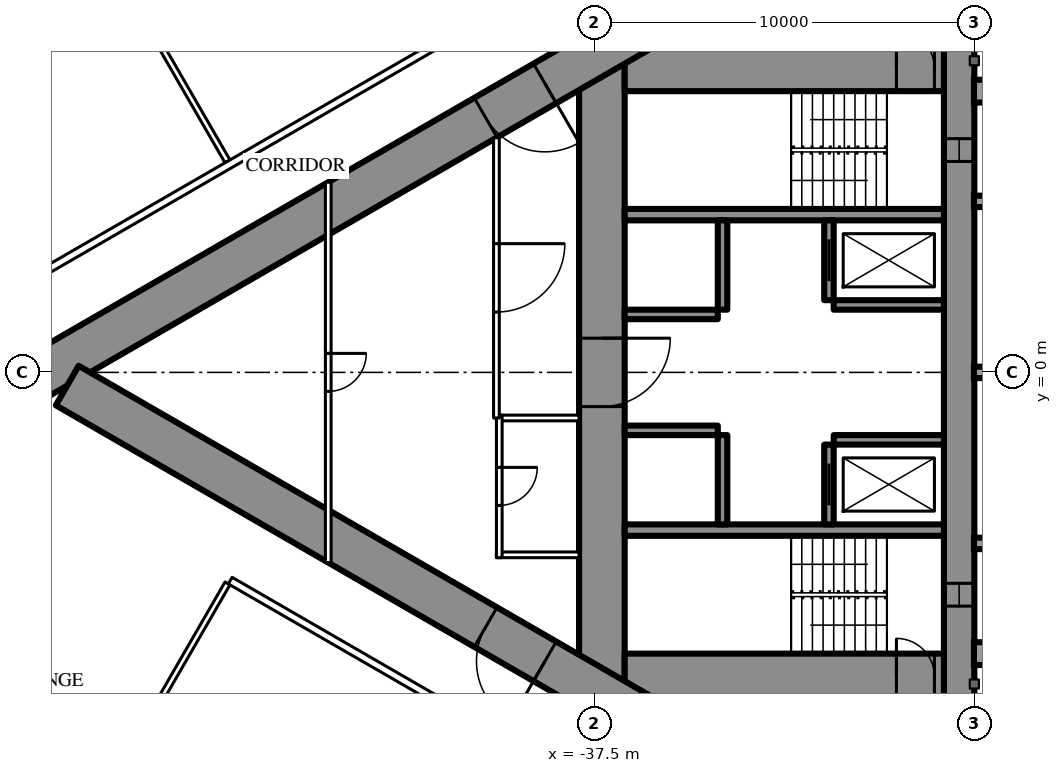
"""IFC4 building model, lengths in metres.
Left out: names, types, materials, properties, quantities, classifications, styles, units other than length and angle.
Written with IfcOpenShell. Run it as: python <this file> out.ifc"""

import sys

from ifc_helpers import new_model, si_unit, direction, frame, frame_2d, origin, place, context, subcontext, project, spatial, rectangle, extrude, element, fill, save


model = new_model("IFC4")
c1 = context("Model", 3, precision=1e-05, world=origin(), true_north=direction((0.0, 1.0)))
c2 = subcontext(c1, "Body", "Model", "MODEL_VIEW")
j1 = project(units=[si_unit("LENGTHUNIT", "METRE"), si_unit("PLANEANGLEUNIT", "RADIAN")], contexts=[c1])
p1 = place(None, origin())
s1 = spatial("IfcSite", under=j1, at=p1, CompositionType="ELEMENT")
p2 = place(p1, origin())
s2 = spatial("IfcBuilding", under=s1, at=p2, CompositionType="ELEMENT")
p3 = place(p2, frame((0.0, 0.0, 139.6)))
s3 = spatial("IfcBuildingStorey", under=s2, at=p3, CompositionType="ELEMENT", Elevation=139.6)
p4 = place(p3, frame((-27.9, 8.6, 0.0), z_axis=(0.0, 0.0, 1.0), x_axis=(0.0, -1.0, 0.0)))
e1 = element("IfcWall", 1, at=p4, inside=s3, PredefinedType="SHEAR", context=c2, shape_type="SweptSolid", body=[
    extrude(rectangle(XDim=17.2, YDim=0.8, at=frame_2d((8.6, 0.0))), origin(), (0.0, 0.0, 1.0), 3.5),
])
p5 = place(p4, frame((2.45, 0.0, 0.6)))
e2 = element("IfcOpeningElement", 2, at=p5, cuts=e1, PredefinedType="OPENING", context=c2, shape_type="SweptSolid", body=[
    extrude(rectangle(XDim=0.6, YDim=2.1, at=frame_2d((0.3, 1.05))), frame((0.0, 0.41, 0.0), z_axis=(0.0, -1.0, 0.0), x_axis=(1.0, 0.0, 0.0)), (0.0, 0.0, 1.0), 0.82),
])
p6 = place(p4, frame((14.15, 0.0, 0.6)))
e3 = element("IfcOpeningElement", 3, at=p6, cuts=e1, PredefinedType="OPENING", context=c2, shape_type="SweptSolid", body=[
    extrude(rectangle(XDim=0.6, YDim=2.1, at=frame_2d((0.3, 1.05))), frame((0.0, 0.41, 0.0), z_axis=(0.0, -1.0, 0.0), x_axis=(1.0, 0.0, 0.0)), (0.0, 0.0, 1.0), 0.82),
])
p7 = place(p3, frame((-37.3, 8.6, 0.0), z_axis=(0.0, 0.0, 1.0), x_axis=(0.0, -1.0, 0.0)))
e4 = element("IfcWall", 4, at=p7, inside=s3, PredefinedType="SHEAR", context=c2, shape_type="SweptSolid", body=[
    extrude(rectangle(XDim=17.2, YDim=1.2, at=frame_2d((8.6, 0.0))), origin(), (0.0, 0.0, 1.0), 3.5),
])
p8 = place(p7, frame((7.7, 0.0, 0.0)))
e5 = element("IfcOpeningElement", 5, at=p8, cuts=e4, PredefinedType="OPENING", context=c2, shape_type="SweptSolid", body=[
    extrude(rectangle(XDim=1.8, YDim=2.2, at=frame_2d((0.9, 1.1))), frame((0.0, 0.61, 0.0), z_axis=(0.0, -1.0, 0.0), x_axis=(1.0, 0.0, 0.0)), (0.0, 0.0, 1.0), 1.22),
])
p9 = place(p3, frame((-28.3, 8.0, 0.0), z_axis=(0.0, 0.0, 1.0), x_axis=(-1.0, 0.0, 0.0)))
e6 = element("IfcWall", 6, at=p9, inside=s3, PredefinedType="SHEAR", context=c2, shape_type="SweptSolid", body=[
    extrude(rectangle(XDim=8.4, YDim=1.2, at=frame_2d((4.2, 0.0))), origin(), (0.0, 0.0, 1.0), 3.5),
])
p10 = place(p9, frame((0.25, 0.0, 0.0)))
e7 = element("IfcOpeningElement", 7, at=p10, cuts=e6, PredefinedType="OPENING", context=c2, shape_type="SweptSolid", body=[
    extrude(rectangle(XDim=1.0, YDim=2.2, at=frame_2d((0.5, 1.1))), frame((0.0, 0.61, 0.0), z_axis=(0.0, -1.0, 0.0), x_axis=(1.0, 0.0, 0.0)), (0.0, 0.0, 1.0), 1.22),
])
p11 = place(p3, frame((-28.3, -8.0, 0.0), z_axis=(0.0, 0.0, 1.0), x_axis=(-1.0, 0.0, 0.0)))
e8 = element("IfcWall", 8, at=p11, inside=s3, PredefinedType="SHEAR", context=c2, shape_type="SweptSolid", body=[
    extrude(rectangle(XDim=8.4, YDim=1.2, at=frame_2d((4.2, 0.0))), origin(), (0.0, 0.0, 1.0), 3.5),
])
p12 = place(p11, frame((0.25, 0.0, 0.0)))
e9 = element("IfcOpeningElement", 9, at=p12, cuts=e8, PredefinedType="OPENING", context=c2, shape_type="SweptSolid", body=[
    extrude(rectangle(XDim=1.0, YDim=2.2, at=frame_2d((0.5, 1.1))), frame((0.0, 0.61, 0.0), z_axis=(0.0, -1.0, 0.0), x_axis=(1.0, 0.0, 0.0)), (0.0, 0.0, 1.0), 1.22),
])
for number, where, z_axis, x_axis in (
    (10, (-28.3, 4.15, 0.0), (0.0, 0.0, 1.0), (-1.0, 0.0, 0.0)),
    (11, (-28.3, -4.15, 0.0), (0.0, 0.0, 1.0), (-1.0, 0.0, 0.0)),
):
    element("IfcWall", number, at=place(p3, frame(where, z_axis=z_axis, x_axis=x_axis)), inside=s3, PredefinedType="SHEAR", context=c2, shape_type="SweptSolid", body=[
        extrude(rectangle(XDim=8.4, YDim=0.3, at=frame_2d((4.2, 0.0))), origin(), (0.0, 0.0, 1.0), 3.5),
    ])
p13 = place(p3, frame((-31.325, 4.0, 0.0), z_axis=(0.0, 0.0, 1.0), x_axis=(0.0, -1.0, 0.0)))
e12 = element("IfcWall", 12, at=p13, inside=s3, PredefinedType="SHEAR", context=c2, shape_type="SweptSolid", body=[
    extrude(rectangle(XDim=2.1, YDim=0.25, at=frame_2d((1.05, 0.0))), origin(), (0.0, 0.0, 1.0), 3.5),
])
p14 = place(p13, frame((0.5, 0.0, 0.0)))
e13 = element("IfcOpeningElement", 13, at=p14, cuts=e12, PredefinedType="OPENING", context=c2, shape_type="SweptSolid", body=[
    extrude(rectangle(XDim=1.1, YDim=2.2, at=frame_2d((0.55, 1.1))), frame((0.0, 0.135, 0.0), z_axis=(0.0, -1.0, 0.0), x_axis=(1.0, 0.0, 0.0)), (0.0, 0.0, 1.0), 0.27),
])
p15 = place(p3, frame((-34.125, 4.0, 0.0), z_axis=(0.0, 0.0, 1.0), x_axis=(0.0, -1.0, 0.0)))
e14 = element("IfcWall", 14, at=p15, inside=s3, PredefinedType="SHEAR", context=c2, shape_type="SweptSolid", body=[
    extrude(rectangle(XDim=2.35, YDim=0.25, at=frame_2d((1.175, 0.0))), origin(), (0.0, 0.0, 1.0), 3.5),
])
p16 = place(p3, frame((-28.3, 1.775, 0.0), z_axis=(0.0, 0.0, 1.0), x_axis=(-1.0, 0.0, 0.0)))
e15 = element("IfcWall", 15, at=p16, inside=s3, PredefinedType="SHEAR", context=c2, shape_type="SweptSolid", body=[
    extrude(rectangle(XDim=2.9, YDim=0.25, at=frame_2d((1.45, 0.0))), origin(), (0.0, 0.0, 1.0), 3.5),
])
p17 = place(p3, frame((-34.25, 1.525, 0.0), z_axis=(0.0, 0.0, 1.0), x_axis=(-1.0, 0.0, 0.0)))
e16 = element("IfcWall", 16, at=p17, inside=s3, PredefinedType="SHEAR", context=c2, shape_type="SweptSolid", body=[
    extrude(rectangle(XDim=2.45, YDim=0.25, at=frame_2d((1.225, 0.0))), origin(), (0.0, 0.0, 1.0), 3.5),
])
p18 = place(p3, frame((-31.325, -1.9, 0.0), z_axis=(0.0, 0.0, 1.0), x_axis=(0.0, -1.0, 0.0)))
e17 = element("IfcWall", 17, at=p18, inside=s3, PredefinedType="SHEAR", context=c2, shape_type="SweptSolid", body=[
    extrude(rectangle(XDim=2.1, YDim=0.25, at=frame_2d((1.05, 0.0))), origin(), (0.0, 0.0, 1.0), 3.5),
])
p19 = place(p18, frame((0.5, 0.0, 0.0)))
e18 = element("IfcOpeningElement", 18, at=p19, cuts=e17, PredefinedType="OPENING", context=c2, shape_type="SweptSolid", body=[
    extrude(rectangle(XDim=1.1, YDim=2.2, at=frame_2d((0.55, 1.1))), frame((0.0, 0.135, 0.0), z_axis=(0.0, -1.0, 0.0), x_axis=(1.0, 0.0, 0.0)), (0.0, 0.0, 1.0), 0.27),
])
p20 = place(p3, frame((-34.125, -1.65, 0.0), z_axis=(0.0, 0.0, 1.0), x_axis=(0.0, -1.0, 0.0)))
e19 = element("IfcWall", 19, at=p20, inside=s3, PredefinedType="SHEAR", context=c2, shape_type="SweptSolid", body=[
    extrude(rectangle(XDim=2.35, YDim=0.25, at=frame_2d((1.175, 0.0))), origin(), (0.0, 0.0, 1.0), 3.5),
])
p21 = place(p3, frame((-28.3, -1.775, 0.0), z_axis=(0.0, 0.0, 1.0), x_axis=(-1.0, 0.0, 0.0)))
e20 = element("IfcWall", 20, at=p21, inside=s3, PredefinedType="SHEAR", context=c2, shape_type="SweptSolid", body=[
    extrude(rectangle(XDim=2.9, YDim=0.25, at=frame_2d((1.45, 0.0))), origin(), (0.0, 0.0, 1.0), 3.5),
])
p22 = place(p3, frame((-34.25, -1.525, 0.0), z_axis=(0.0, 0.0, 1.0), x_axis=(-1.0, 0.0, 0.0)))
e21 = element("IfcWall", 21, at=p22, inside=s3, PredefinedType="SHEAR", context=c2, shape_type="SweptSolid", body=[
    extrude(rectangle(XDim=2.45, YDim=0.25, at=frame_2d((1.225, 0.0))), origin(), (0.0, 0.0, 1.0), 3.5),
])
p23 = place(p3, frame((-27.2, 14.3, 0.0), z_axis=(0.0, 0.0, 1.0), x_axis=(-0.866026593062, -0.499997940104, 0.0)))
e22 = element("IfcWall", 22, at=p23, inside=s3, PredefinedType="SHEAR", context=c2, shape_type="SweptSolid", body=[
    extrude(rectangle(XDim=28.946, YDim=1.2, at=frame_2d((14.473, 0.0))), origin(), (0.0, 0.0, 1.0), 3.5),
])
p24 = place(p23, frame((4.6, 0.0, 0.0)))
e23 = element("IfcOpeningElement", 23, at=p24, cuts=e22, PredefinedType="OPENING", context=c2, shape_type="SweptSolid", body=[
    extrude(rectangle(XDim=1.0, YDim=2.2, at=frame_2d((0.5, 1.1))), frame((0.0, 0.61, 0.0), z_axis=(0.0, -1.0, 0.0), x_axis=(1.0, 0.0, 0.0)), (0.0, 0.0, 1.0), 1.22),
])
p25 = place(p23, frame((13.395, 0.0, 0.0)))
e24 = element("IfcOpeningElement", 24, at=p25, cuts=e22, PredefinedType="OPENING", context=c2, shape_type="SweptSolid", body=[
    extrude(rectangle(XDim=1.8, YDim=2.2, at=frame_2d((0.9, 1.1))), frame((0.0, 0.61, 0.0), z_axis=(0.0, -1.0, 0.0), x_axis=(1.0, 0.0, 0.0)), (0.0, 0.0, 1.0), 1.22),
])
p26 = place(p3, frame((-27.2, -14.3, 0.0), z_axis=(0.0, 0.0, 1.0), x_axis=(-0.866024021859, 0.500002393557, 0.0)))
e25 = element("IfcWall", 25, at=p26, inside=s3, PredefinedType="SHEAR", context=c2, shape_type="SweptSolid", body=[
    extrude(rectangle(XDim=27.907, YDim=1.2, at=frame_2d((13.954, 0.0))), origin(), (0.0, 0.0, 1.0), 3.5),
])
p27 = place(p26, frame((4.6, 0.0, 0.0)))
e26 = element("IfcOpeningElement", 26, at=p27, cuts=e25, PredefinedType="OPENING", context=c2, shape_type="SweptSolid", body=[
    extrude(rectangle(XDim=1.0, YDim=2.2, at=frame_2d((0.5, 1.1))), frame((0.0, 0.61, 0.0), z_axis=(0.0, -1.0, 0.0), x_axis=(1.0, 0.0, 0.0)), (0.0, 0.0, 1.0), 1.22),
])
p28 = place(p26, frame((13.395, 0.0, 0.0)))
e27 = element("IfcOpeningElement", 27, at=p28, cuts=e25, PredefinedType="OPENING", context=c2, shape_type="SweptSolid", body=[
    extrude(rectangle(XDim=1.8, YDim=2.2, at=frame_2d((0.9, 1.1))), frame((0.0, 0.61, 0.0), z_axis=(0.0, -1.0, 0.0), x_axis=(1.0, 0.0, 0.0)), (0.0, 0.0, 1.0), 1.22),
])
for number, where, z_axis, x_axis in (
    (28, (-47.151, 5.552, 0.0), (0.0, 0.0, 1.0), (-0.5, 0.866, 0.0)),
    (29, (-47.151, -5.552, 0.0), (0.0, 0.0, 1.0), (-0.5, -0.866, 0.0)),
):
    element("IfcWall", number, at=place(p3, frame(where, z_axis=z_axis, x_axis=x_axis)), inside=s3, PredefinedType="PARTITIONING", context=c2, shape_type="SweptSolid", body=[
        extrude(rectangle(XDim=8.311, YDim=0.15, at=frame_2d((4.156, 0.0))), origin(), (0.0, 0.0, 1.0), 2.2),
    ])
p29 = place(p3, frame((-37.7, 10.894, 0.0), z_axis=(0.0, 0.0, 1.0), x_axis=(-0.866027905338, -0.499995667157, 0.0)))
e30 = element("IfcWall", 30, at=p29, inside=s3, PredefinedType="PARTITIONING", context=c2, shape_type="SweptSolid", body=[
    extrude(rectangle(XDim=21.787, YDim=0.2, at=frame_2d((10.894, 0.0))), origin(), (0.0, 0.0, 1.0), 3.25),
])
p30 = place(p29, frame((17.711, 0.0, 0.0)))
e31 = element("IfcOpeningElement", 31, at=p30, cuts=e30, PredefinedType="OPENING", context=c2, shape_type="SweptSolid", body=[
    extrude(rectangle(XDim=0.95, YDim=2.2, at=frame_2d((0.475, 1.1))), frame((0.0, 0.11, 0.0), z_axis=(0.0, -1.0, 0.0), x_axis=(1.0, 0.0, 0.0)), (0.0, 0.0, 1.0), 0.22),
])
p31 = place(p29, frame((19.399, 0.0, 0.0)))
e32 = element("IfcOpeningElement", 32, at=p31, cuts=e30, PredefinedType="OPENING", context=c2, shape_type="SweptSolid", body=[
    extrude(rectangle(XDim=1.8, YDim=2.2, at=frame_2d((0.9, 1.1))), frame((0.0, 0.11, 0.0), z_axis=(0.0, -1.0, 0.0), x_axis=(1.0, 0.0, 0.0)), (0.0, 0.0, 1.0), 0.22),
])
p32 = place(p29, frame((0.6, 0.0, 0.0)))
e33 = element("IfcOpeningElement", 33, at=p32, cuts=e30, PredefinedType="OPENING", context=c2, shape_type="SweptSolid", body=[
    extrude(rectangle(XDim=0.95, YDim=2.2, at=frame_2d((0.475, 1.1))), frame((0.0, 0.11, 0.0), z_axis=(0.0, -1.0, 0.0), x_axis=(1.0, 0.0, 0.0)), (0.0, 0.0, 1.0), 0.22),
])
p33 = place(p3, frame((-36.92, -11.344, 0.0), z_axis=(0.0, 0.0, 1.0), x_axis=(-0.866027897759, 0.499995680284, 0.0)))
e34 = element("IfcWall", 34, at=p33, inside=s3, PredefinedType="PARTITIONING", context=c2, shape_type="SweptSolid", body=[
    extrude(rectangle(XDim=11.731, YDim=0.2, at=frame_2d((5.865, 0.0))), origin(), (0.0, 0.0, 1.0), 3.25),
])
p34 = place(p33, frame((3.35, 0.0, 0.0)))
e35 = element("IfcOpeningElement", 35, at=p34, cuts=e34, PredefinedType="OPENING", context=c2, shape_type="SweptSolid", body=[
    extrude(rectangle(XDim=1.0, YDim=2.2, at=frame_2d((0.5, 1.1))), frame((0.0, 0.11, 0.0), z_axis=(0.0, -1.0, 0.0), x_axis=(1.0, 0.0, 0.0)), (0.0, 0.0, 1.0), 0.22),
])
for number, where, z_axis, x_axis in (
    (36, (-37.9, -1.2, 0.0), (0.0, 0.0, 1.0), (-1.0, 0.0, 0.0)),
    (37, (-37.9, -4.8, 0.0), (0.0, 0.0, 1.0), (-1.0, 0.0, 0.0)),
):
    element("IfcWall", number, at=place(p3, frame(where, z_axis=z_axis, x_axis=x_axis)), inside=s3, PredefinedType="PARTITIONING", context=c2, shape_type="SweptSolid", body=[
        extrude(rectangle(XDim=2.175, YDim=0.15, at=frame_2d((1.087, 0.0))), origin(), (0.0, 0.0, 1.0), 3.25),
    ])
p35 = place(p3, frame((-40.0, -1.125, 0.0), z_axis=(0.0, 0.0, 1.0), x_axis=(0.0, -1.0, 0.0)))
e38 = element("IfcWall", 38, at=p35, inside=s3, PredefinedType="PARTITIONING", context=c2, shape_type="SweptSolid", body=[
    extrude(rectangle(XDim=3.75, YDim=0.15, at=frame_2d((1.875, 0.0))), origin(), (0.0, 0.0, 1.0), 3.25),
])
p36 = place(p35, frame((1.375, 0.0, 0.0)))
e39 = element("IfcOpeningElement", 39, at=p36, cuts=e38, PredefinedType="OPENING", context=c2, shape_type="SweptSolid", body=[
    extrude(rectangle(XDim=1.0, YDim=2.2, at=frame_2d((0.5, 1.1))), frame((0.0, 0.085, 0.0), z_axis=(0.0, -1.0, 0.0), x_axis=(1.0, 0.0, 0.0)), (0.0, 0.0, 1.0), 0.17),
])
p37 = place(p3, frame((-40.075, 6.174, 0.0), z_axis=(0.0, 0.0, 1.0), x_axis=(0.0, -1.0, 0.0)))
e40 = element("IfcWall", 40, at=p37, inside=s3, PredefinedType="PARTITIONING", context=c2, shape_type="SweptSolid", body=[
    extrude(rectangle(XDim=7.374, YDim=0.15, at=frame_2d((3.687, 0.0))), origin(), (0.0, 0.0, 1.0), 3.25),
])
p38 = place(p37, frame((2.787, 0.0, 0.0)))
e41 = element("IfcOpeningElement", 41, at=p38, cuts=e40, PredefinedType="OPENING", context=c2, shape_type="SweptSolid", body=[
    extrude(rectangle(XDim=1.8, YDim=2.2, at=frame_2d((0.9, 1.1))), frame((0.0, 0.085, 0.0), z_axis=(0.0, -1.0, 0.0), x_axis=(1.0, 0.0, 0.0)), (0.0, 0.0, 1.0), 0.17),
])
p39 = place(p3, frame((-44.5, 5.005, 0.0), z_axis=(0.0, 0.0, 1.0), x_axis=(0.0, -1.0, 0.0)))
e42 = element("IfcWall", 42, at=p39, inside=s3, PredefinedType="PARTITIONING", context=c2, shape_type="SweptSolid", body=[
    extrude(rectangle(XDim=10.009, YDim=0.15, at=frame_2d((5.005, 0.0))), origin(), (0.0, 0.0, 1.0), 2.45),
])
p40 = place(p39, frame((4.505, 0.0, 0.0)))
e43 = element("IfcOpeningElement", 43, at=p40, cuts=e42, PredefinedType="OPENING", context=c2, shape_type="SweptSolid", body=[
    extrude(rectangle(XDim=1.0, YDim=2.2, at=frame_2d((0.5, 1.1))), frame((0.0, 0.085, 0.0), z_axis=(0.0, -1.0, 0.0), x_axis=(1.0, 0.0, 0.0)), (0.0, 0.0, 1.0), 0.17),
])
p41 = place(p36, origin())
e44 = element("IfcDoor", 44, at=p41, inside=s3, OperationType="SINGLE_SWING_LEFT", PredefinedType="DOOR", context=c2, shape_type="SweptSolid", body=[
    extrude(rectangle(XDim=1.0, YDim=2.2, at=frame_2d((0.5, 1.1))), frame((0.0, 0.025, 0.0), z_axis=(0.0, -1.0, 0.0), x_axis=(1.0, 0.0, 0.0)), (0.0, 0.0, 1.0), 0.05),
])
fill(e39, e44)
p42 = place(p38, origin())
e45 = element("IfcDoor", 45, at=p42, inside=s3, OperationType="DOUBLE_DOOR_SINGLE_SWING", PredefinedType="DOOR", context=c2, shape_type="SweptSolid", body=[
    extrude(rectangle(XDim=1.8, YDim=2.2, at=frame_2d((0.9, 1.1))), frame((0.0, 0.025, 0.0), z_axis=(0.0, -1.0, 0.0), x_axis=(1.0, 0.0, 0.0)), (0.0, 0.0, 1.0), 0.05),
])
fill(e41, e45)
p43 = place(p40, origin())
e46 = element("IfcDoor", 46, at=p43, inside=s3, OperationType="SINGLE_SWING_LEFT", PredefinedType="DOOR", context=c2, shape_type="SweptSolid", body=[
    extrude(rectangle(XDim=1.0, YDim=2.2, at=frame_2d((0.5, 1.1))), frame((0.0, 0.025, 0.0), z_axis=(0.0, -1.0, 0.0), x_axis=(1.0, 0.0, 0.0)), (0.0, 0.0, 1.0), 0.05),
])
fill(e43, e46)
p44 = place(p25, origin())
e47 = element("IfcDoor", 47, at=p44, inside=s3, OperationType="DOUBLE_DOOR_SINGLE_SWING", PredefinedType="DOOR", context=c2, shape_type="SweptSolid", body=[
    extrude(rectangle(XDim=1.8, YDim=2.2, at=frame_2d((0.9, 1.1))), frame((0.0, 0.025, 0.0), z_axis=(0.0, -1.0, 0.0), x_axis=(1.0, 0.0, 0.0)), (0.0, 0.0, 1.0), 0.05),
])
fill(e24, e47)
p45 = place(p28, origin())
e48 = element("IfcDoor", 48, at=p45, inside=s3, OperationType="DOUBLE_DOOR_SINGLE_SWING", PredefinedType="DOOR", context=c2, shape_type="SweptSolid", body=[
    extrude(rectangle(XDim=1.8, YDim=2.2, at=frame_2d((0.9, 1.1))), frame((0.0, 0.025, 0.0), z_axis=(0.0, -1.0, 0.0), x_axis=(1.0, 0.0, 0.0)), (0.0, 0.0, 1.0), 0.05),
])
fill(e27, e48)
p46 = place(p8, origin())
e49 = element("IfcDoor", 49, at=p46, inside=s3, OperationType="DOUBLE_DOOR_SINGLE_SWING", PredefinedType="DOOR", context=c2, shape_type="SweptSolid", body=[
    extrude(rectangle(XDim=1.8, YDim=2.2, at=frame_2d((0.9, 1.1))), frame((0.0, 0.025, 0.0), z_axis=(0.0, -1.0, 0.0), x_axis=(1.0, 0.0, 0.0)), (0.0, 0.0, 1.0), 0.05),
])
fill(e5, e49)
p47 = place(p10, origin())
e50 = element("IfcDoor", 50, at=p47, inside=s3, OperationType="SINGLE_SWING_RIGHT", PredefinedType="DOOR", context=c2, shape_type="SweptSolid", body=[
    extrude(rectangle(XDim=1.0, YDim=2.2, at=frame_2d((0.5, 1.1))), frame((0.0, 0.025, 0.0), z_axis=(0.0, -1.0, 0.0), x_axis=(1.0, 0.0, 0.0)), (0.0, 0.0, 1.0), 0.05),
])
fill(e7, e50)
p48 = place(p12, origin())
e51 = element("IfcDoor", 51, at=p48, inside=s3, OperationType="SINGLE_SWING_RIGHT", PredefinedType="DOOR", context=c2, shape_type="SweptSolid", body=[
    extrude(rectangle(XDim=1.0, YDim=2.2, at=frame_2d((0.5, 1.1))), frame((0.0, 0.025, 0.0), z_axis=(0.0, -1.0, 0.0), x_axis=(1.0, 0.0, 0.0)), (0.0, 0.0, 1.0), 0.05),
])
fill(e9, e51)
p49 = place(p14, origin())
e52 = element("IfcDoor", 52, at=p49, inside=s3, OperationType="SLIDING_TO_LEFT", PredefinedType="USERDEFINED", context=c2, shape_type="SweptSolid", body=[
    extrude(rectangle(XDim=1.1, YDim=2.2, at=frame_2d((0.55, 1.1))), frame((0.0, 0.025, 0.0), z_axis=(0.0, -1.0, 0.0), x_axis=(1.0, 0.0, 0.0)), (0.0, 0.0, 1.0), 0.05),
])
fill(e13, e52)
p50 = place(p19, origin())
e53 = element("IfcDoor", 53, at=p50, inside=s3, OperationType="SLIDING_TO_LEFT", PredefinedType="USERDEFINED", context=c2, shape_type="SweptSolid", body=[
    extrude(rectangle(XDim=1.1, YDim=2.2, at=frame_2d((0.55, 1.1))), frame((0.0, 0.025, 0.0), z_axis=(0.0, -1.0, 0.0), x_axis=(1.0, 0.0, 0.0)), (0.0, 0.0, 1.0), 0.05),
])
fill(e18, e53)
p51 = place(p5, origin())
e54 = element("IfcWindow", 54, at=p51, inside=s3, PartitioningType="SINGLE_PANEL", PredefinedType="WINDOW", context=c2, shape_type="SweptSolid", body=[
    extrude(rectangle(XDim=0.6, YDim=2.1, at=frame_2d((0.3, 1.05))), frame((0.0, 0.03, 0.0), z_axis=(0.0, -1.0, 0.0), x_axis=(1.0, 0.0, 0.0)), (0.0, 0.0, 1.0), 0.06),
])
fill(e2, e54)
p52 = place(p6, origin())
e55 = element("IfcWindow", 55, at=p52, inside=s3, PartitioningType="SINGLE_PANEL", PredefinedType="WINDOW", context=c2, shape_type="SweptSolid", body=[
    extrude(rectangle(XDim=0.6, YDim=2.1, at=frame_2d((0.3, 1.05))), frame((0.0, 0.03, 0.0), z_axis=(0.0, -1.0, 0.0), x_axis=(1.0, 0.0, 0.0)), (0.0, 0.0, 1.0), 0.06),
])
fill(e3, e55)
save(model, sys.argv[1])
